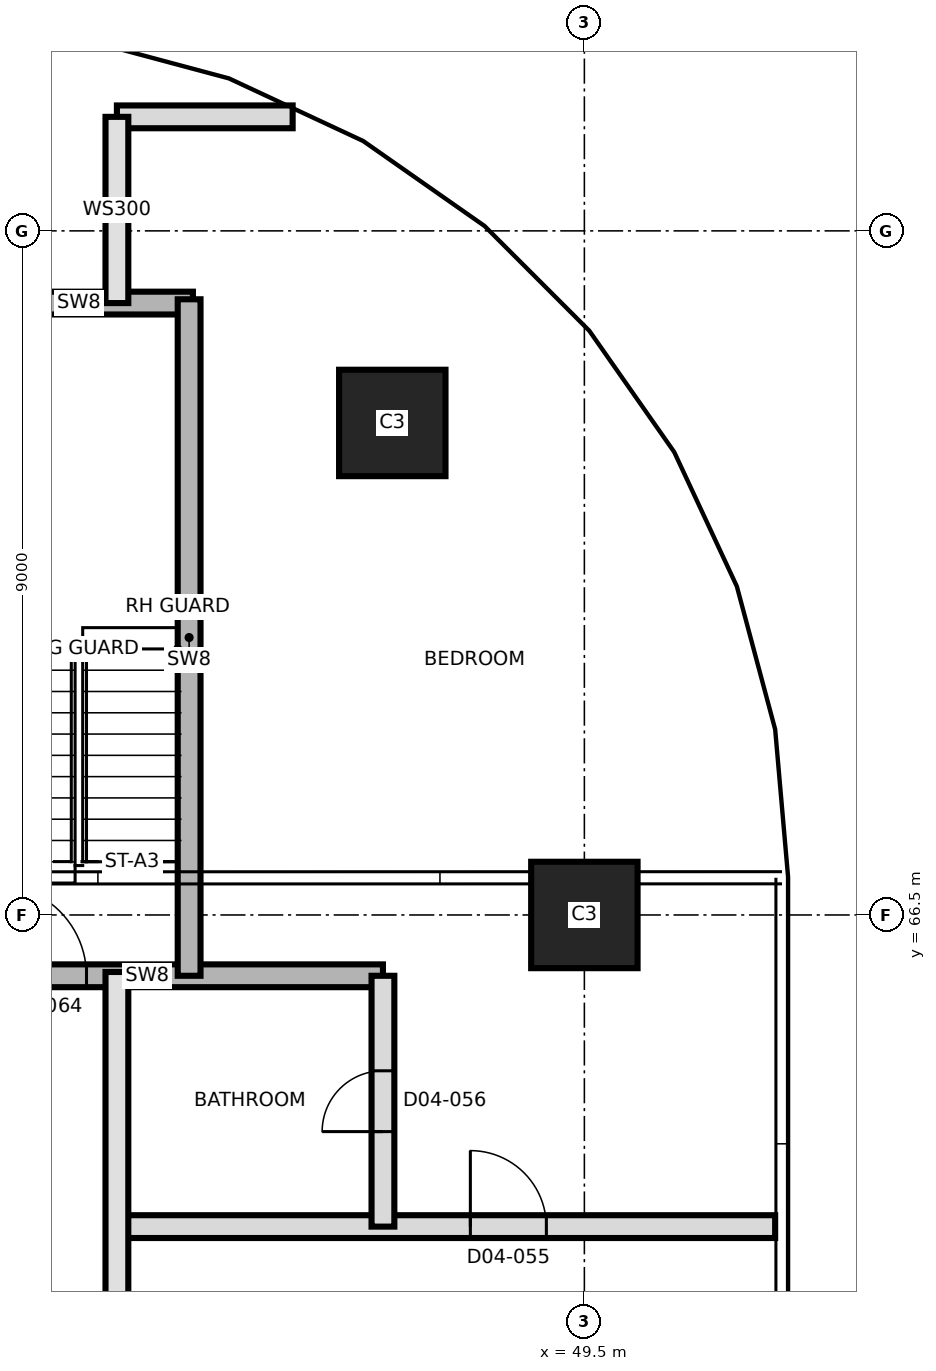
"""IFC4 building model, lengths in metres.
Left out: names, types, materials, properties, quantities, classifications, styles, units other than length and angle.
Written with IfcOpenShell. Run it as: python <this file> out.ifc"""

import sys

from ifc_helpers import new_model, si_unit, direction, frame, frame_2d, origin, origin_2d, place, context, subcontext, project, spatial, rectangle, extrude, element, fill, save


model = new_model("IFC4")
c1 = context("Model", 3, precision=1e-05, world=origin(), true_north=direction((0.0, 1.0)))
c2 = subcontext(c1, "Body", "Model", "MODEL_VIEW")
j1 = project(units=[si_unit("LENGTHUNIT", "METRE"), si_unit("PLANEANGLEUNIT", "RADIAN")], contexts=[c1])
p1 = place(None, origin())
s1 = spatial("IfcSite", under=j1, at=p1, CompositionType="ELEMENT")
p2 = place(p1, origin())
s2 = spatial("IfcBuilding", under=s1, at=p2, CompositionType="ELEMENT")
p3 = place(p2, frame((0.0, 0.0, 63.1)))
s3 = spatial("IfcBuildingStorey", under=s2, at=p3, CompositionType="ELEMENT", Elevation=63.1)
for number, where, z_axis, x_axis in (
    (1, (49.5, 66.5, 0.0), (0.0, 0.0, 1.0), (1.0, 0.0, 0.0)),
    (2, (46.973, 72.973, 0.0), (0.0, 0.0, 1.0), (1.0, 0.0, 0.0)),
):
    element("IfcColumn", number, at=place(p3, frame(where, z_axis=z_axis, x_axis=x_axis)), inside=s3, PredefinedType="COLUMN", context=c2, shape_type="SweptSolid", body=[
        extrude(rectangle(XDim=1.4, YDim=1.4, at=origin_2d()), origin(), (0.0, 0.0, 1.0), 3.7),
    ])
p4 = place(p3, frame((43.35, 62.4, 0.0), z_axis=(0.0, 0.0, 1.0), x_axis=(1.0, 0.0, 0.0)))
e3 = element("IfcWall", 3, at=p4, inside=s3, PredefinedType="PARTITIONING", context=c2, shape_type="SweptSolid", body=[
    extrude(rectangle(XDim=8.66, YDim=0.3, at=frame_2d((4.33, 0.0))), origin(), (0.0, 0.0, 1.0), 3.4),
])
p5 = place(p4, frame((4.65, 0.0, 0.0)))
e4 = element("IfcOpeningElement", 4, at=p5, cuts=e3, PredefinedType="OPENING", context=c2, shape_type="SweptSolid", body=[
    extrude(rectangle(XDim=1.0, YDim=2.1, at=frame_2d((0.5, 1.05))), frame((0.0, 0.16, 0.0), z_axis=(0.0, -1.0, 0.0), x_axis=(1.0, 0.0, 0.0)), (0.0, 0.0, 1.0), 0.32),
])
p6 = place(p3, frame((40.65, 65.7, 0.0), z_axis=(0.0, 0.0, 1.0), x_axis=(1.0, 0.0, 0.0)))
e5 = element("IfcWall", 5, at=p6, inside=s3, PredefinedType="SHEAR", context=c2, shape_type="SweptSolid", body=[
    extrude(rectangle(XDim=6.2, YDim=0.3, at=frame_2d((3.1, 0.0))), origin(), (0.0, 0.0, 1.0), 3.4),
])
p7 = place(p6, frame((1.1, 0.0, 0.0)))
e6 = element("IfcOpeningElement", 6, at=p7, cuts=e5, PredefinedType="OPENING", context=c2, shape_type="SweptSolid", body=[
    extrude(rectangle(XDim=1.2, YDim=2.1, at=frame_2d((0.6, 1.05))), frame((0.0, 0.16, 0.0), z_axis=(0.0, -1.0, 0.0), x_axis=(1.0, 0.0, 0.0)), (0.0, 0.0, 1.0), 0.32),
])
p8 = place(p3, frame((41.35, 74.55, 0.0), z_axis=(0.0, 0.0, 1.0), x_axis=(1.0, 0.0, 0.0)))
e7 = element("IfcWall", 7, at=p8, inside=s3, PredefinedType="SHEAR", context=c2, shape_type="SweptSolid", body=[
    extrude(rectangle(XDim=3.0, YDim=0.3, at=frame_2d((1.5, 0.0))), origin(), (0.0, 0.0, 1.0), 3.4),
])
p9 = place(p3, frame((43.35, 77.0, 0.0), z_axis=(0.0, 0.0, 1.0), x_axis=(1.0, 0.0, 0.0)))
e8 = element("IfcWall", 8, at=p9, inside=s3, PredefinedType="PARTITIONING", context=c2, shape_type="SweptSolid", body=[
    extrude(rectangle(XDim=2.312, YDim=0.3, at=frame_2d((1.156, 0.0))), origin(), (0.0, 0.0, 1.0), 3.4),
])
p10 = place(p3, frame((43.35, 39.95, 0.0), z_axis=(0.0, 0.0, 1.0), x_axis=(0.0, 1.0, 0.0)))
e9 = element("IfcWall", 9, at=p10, inside=s3, PredefinedType="SOLIDWALL", context=c2, shape_type="SweptSolid", body=[
    extrude(rectangle(XDim=25.8, YDim=0.3, at=frame_2d((12.9, 0.0))), origin(), (0.0, 0.0, 1.0), 3.4),
])
p11 = place(p10, frame((2.47, 0.0, 0.0)))
e10 = element("IfcOpeningElement", 10, at=p11, cuts=e9, PredefinedType="OPENING", context=c2, shape_type="SweptSolid", body=[
    extrude(rectangle(XDim=1.0, YDim=2.1, at=frame_2d((0.5, 1.05))), frame((0.0, 0.16, 0.0), z_axis=(0.0, -1.0, 0.0), x_axis=(1.0, 0.0, 0.0)), (0.0, 0.0, 1.0), 0.32),
])
p12 = place(p10, frame((4.27, 0.0, 0.0)))
e11 = element("IfcOpeningElement", 11, at=p12, cuts=e9, PredefinedType="OPENING", context=c2, shape_type="SweptSolid", body=[
    extrude(rectangle(XDim=1.0, YDim=2.1, at=frame_2d((0.5, 1.05))), frame((0.0, 0.16, 0.0), z_axis=(0.0, -1.0, 0.0), x_axis=(1.0, 0.0, 0.0)), (0.0, 0.0, 1.0), 0.32),
])
p13 = place(p10, frame((12.55, 0.0, 0.0)))
e12 = element("IfcOpeningElement", 12, at=p13, cuts=e9, PredefinedType="OPENING", context=c2, shape_type="SweptSolid", body=[
    extrude(rectangle(XDim=1.0, YDim=2.4, at=frame_2d((0.5, 1.2))), frame((0.0, 0.16, 0.0), z_axis=(0.0, -1.0, 0.0), x_axis=(1.0, 0.0, 0.0)), (0.0, 0.0, 1.0), 0.32),
])
p14 = place(p10, frame((19.55, 0.0, 0.0)))
e13 = element("IfcOpeningElement", 13, at=p14, cuts=e9, PredefinedType="OPENING", context=c2, shape_type="SweptSolid", body=[
    extrude(rectangle(XDim=1.0, YDim=2.4, at=frame_2d((0.5, 1.2))), frame((0.0, 0.16, 0.0), z_axis=(0.0, -1.0, 0.0), x_axis=(1.0, 0.0, 0.0)), (0.0, 0.0, 1.0), 0.32),
])
p15 = place(p3, frame((43.35, 74.55, 0.0), z_axis=(0.0, 0.0, 1.0), x_axis=(0.0, 1.0, 0.0)))
e14 = element("IfcWall", 14, at=p15, inside=s3, PredefinedType="SOLIDWALL", context=c2, shape_type="SweptSolid", body=[
    extrude(rectangle(XDim=2.45, YDim=0.3, at=frame_2d((1.225, 0.0))), origin(), (0.0, 0.0, 1.0), 3.4),
])
p16 = place(p3, frame((44.3, 65.7, 0.0), z_axis=(0.0, 0.0, 1.0), x_axis=(0.0, 1.0, 0.0)))
e15 = element("IfcWall", 15, at=p16, inside=s3, PredefinedType="SHEAR", context=c2, shape_type="SweptSolid", body=[
    extrude(rectangle(XDim=8.9, YDim=0.3, at=frame_2d((4.45, 0.0))), origin(), (0.0, 0.0, 1.0), 3.4),
])
p17 = place(p3, frame((46.85, 62.4, 0.0), z_axis=(0.0, 0.0, 1.0), x_axis=(0.0, 1.0, 0.0)))
e16 = element("IfcWall", 16, at=p17, inside=s3, PredefinedType="PARTITIONING", context=c2, shape_type="SweptSolid", body=[
    extrude(rectangle(XDim=3.3, YDim=0.3, at=frame_2d((1.65, 0.0))), origin(), (0.0, 0.0, 1.0), 3.4),
])
p18 = place(p17, frame((1.25, 0.0, 0.0)))
e17 = element("IfcOpeningElement", 17, at=p18, cuts=e16, PredefinedType="OPENING", context=c2, shape_type="SweptSolid", body=[
    extrude(rectangle(XDim=0.8, YDim=2.1, at=frame_2d((0.4, 1.05))), frame((0.0, 0.16, 0.0), z_axis=(0.0, -1.0, 0.0), x_axis=(1.0, 0.0, 0.0)), (0.0, 0.0, 1.0), 0.32),
])
p19 = place(p5, origin())
e18 = element("IfcDoor", 18, at=p19, inside=s3, OperationType="SINGLE_SWING_RIGHT", PredefinedType="DOOR", context=c2, shape_type="SweptSolid", body=[
    extrude(rectangle(XDim=1.0, YDim=2.1, at=frame_2d((0.5, 1.05))), frame((0.0, 0.025, 0.0), z_axis=(0.0, -1.0, 0.0), x_axis=(1.0, 0.0, 0.0)), (0.0, 0.0, 1.0), 0.05),
])
fill(e4, e18)
p20 = place(p18, origin())
e19 = element("IfcDoor", 19, at=p20, inside=s3, OperationType="SINGLE_SWING_LEFT", PredefinedType="DOOR", context=c2, shape_type="SweptSolid", body=[
    extrude(rectangle(XDim=0.8, YDim=2.1, at=frame_2d((0.4, 1.05))), frame((0.0, 0.025, 0.0), z_axis=(0.0, -1.0, 0.0), x_axis=(1.0, 0.0, 0.0)), (0.0, 0.0, 1.0), 0.05),
])
fill(e17, e19)
p21 = place(p7, origin())
e20 = element("IfcDoor", 20, at=p21, inside=s3, OperationType="SINGLE_SWING_RIGHT", PredefinedType="DOOR", context=c2, shape_type="SweptSolid", body=[
    extrude(rectangle(XDim=1.2, YDim=2.1, at=frame_2d((0.6, 1.05))), frame((0.0, 0.025, 0.0), z_axis=(0.0, -1.0, 0.0), x_axis=(1.0, 0.0, 0.0)), (0.0, 0.0, 1.0), 0.05),
])
fill(e6, e20)
save(model, sys.argv[1])
